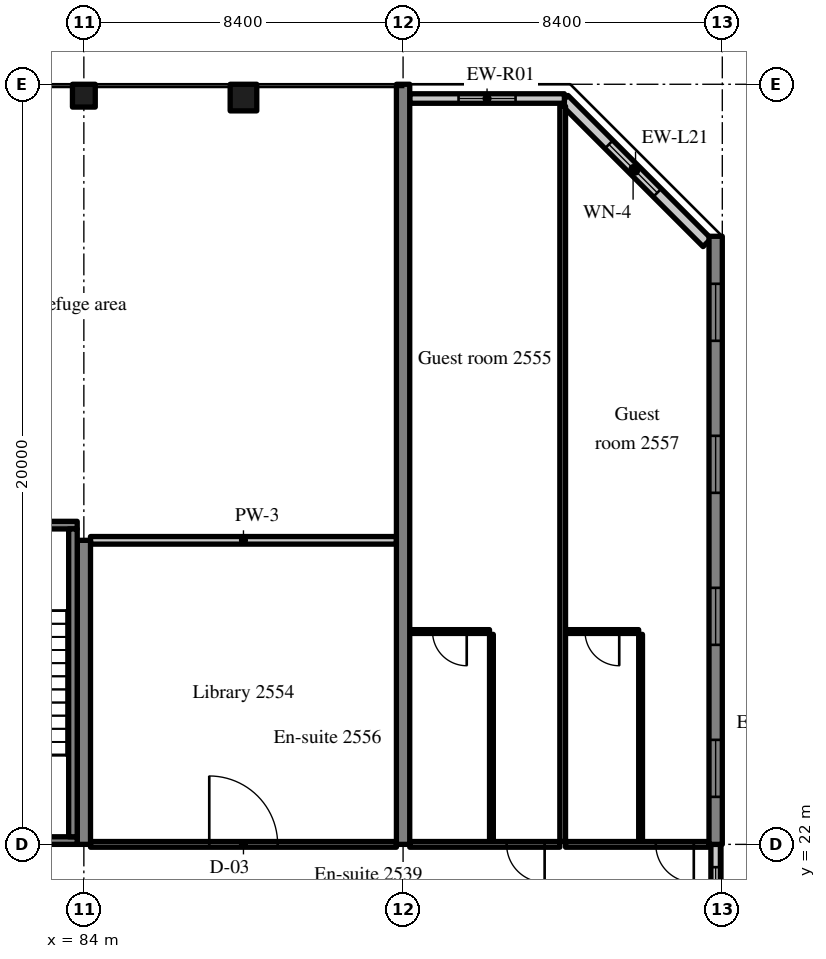
"""IFC4 building model, lengths in metres.
Left out: names, types, materials, properties, quantities, classifications, styles, units other than length and angle.
Written with IfcOpenShell. Run it as: python <this file> out.ifc"""

import sys

from ifc_helpers import new_model, si_unit, direction, frame, frame_2d, origin, origin_2d, place, context, subcontext, project, spatial, rectangle, extrude, source, transform, mapped, element, fill, save


model = new_model("IFC4")
c1 = context("Model", 3, precision=1e-05, world=origin(), true_north=direction((0.0, 1.0)))
c2 = subcontext(c1, "Body", "Model", "MODEL_VIEW")
j1 = project(units=[si_unit("LENGTHUNIT", "METRE"), si_unit("PLANEANGLEUNIT", "RADIAN")], contexts=[c1])
p1 = place(None, origin())
s1 = spatial("IfcSite", under=j1, at=p1, CompositionType="ELEMENT")
p2 = place(p1, origin())
s2 = spatial("IfcBuilding", under=s1, at=p2, CompositionType="ELEMENT")
p3 = place(p2, frame((0.0, 0.0, 106.6)))
s3 = spatial("IfcBuildingStorey", under=s2, at=p3, CompositionType="ELEMENT", Elevation=106.6)
m1 = source(origin(), c2, "Body", "SweptSolid", [
    extrude(rectangle(XDim=8.0, YDim=0.35, at=frame_2d((4.0, 0.0))), origin(), (0.0, 0.0, 1.0), 3.52),
])
p4 = place(p3, frame((84.0, 22.0, 0.0), z_axis=(0.0, 0.0, 1.0), x_axis=(0.0, 1.0, 0.0)))
e1 = element("IfcWall", 1, at=p4, inside=s3, PredefinedType="SHEAR", context=c2, shape_type="MappedRepresentation", body=[
    mapped(m1, transform((0.0, 0.0, 0.0), scale=1.0)),
])
m2 = source(origin(), c2, "Body", "SweptSolid", [
    extrude(rectangle(XDim=20.0, YDim=0.35, at=frame_2d((10.0, 0.0))), origin(), (0.0, 0.0, 1.0), 3.52),
])
p5 = place(p3, frame((92.4, 22.0, 0.0), z_axis=(0.0, 0.0, 1.0), x_axis=(0.0, 1.0, 0.0)))
e2 = element("IfcWall", 2, at=p5, inside=s3, PredefinedType="SHEAR", context=c2, shape_type="MappedRepresentation", body=[
    mapped(m2, transform((0.0, 0.0, 0.0), scale=1.0)),
])
m3 = source(origin(), c2, "Body", "SweptSolid", [
    extrude(rectangle(XDim=16.0, YDim=0.35, at=frame_2d((8.0, 0.0))), origin(), (0.0, 0.0, 1.0), 3.52),
])
p6 = place(p3, frame((100.625, 22.0, 0.0), z_axis=(0.0, 0.0, 1.0), x_axis=(0.0, 1.0, 0.0)))
e3 = element("IfcWall", 3, at=p6, inside=s3, PredefinedType="SHEAR", context=c2, shape_type="MappedRepresentation", body=[
    mapped(m3, transform((0.0, 0.0, 0.0), scale=1.0)),
])
m4 = source(origin(), c2, "Body", "SweptSolid", [
    extrude(rectangle(XDim=1.5, YDim=1.5, at=frame_2d((0.75, 0.75))), frame((0.0, 0.185, 0.0), z_axis=(0.0, -1.0, 0.0), x_axis=(1.0, 0.0, 0.0)), (0.0, 0.0, 1.0), 0.37),
])
p7 = place(p6, frame((1.25, 0.0, 0.9)))
e4 = element("IfcOpeningElement", 4, at=p7, cuts=e3, PredefinedType="OPENING", context=c2, shape_type="MappedRepresentation", body=[
    mapped(m4, transform((0.0, 0.0, 0.0), scale=1.0)),
])
p8 = place(p6, frame((5.25, 0.0, 0.9)))
e5 = element("IfcOpeningElement", 5, at=p8, cuts=e3, PredefinedType="OPENING", context=c2, shape_type="MappedRepresentation", body=[
    mapped(m4, transform((0.0, 0.0, 0.0), scale=1.0)),
])
p9 = place(p6, frame((9.25, 0.0, 0.9)))
e6 = element("IfcOpeningElement", 6, at=p9, cuts=e3, PredefinedType="OPENING", context=c2, shape_type="MappedRepresentation", body=[
    mapped(m4, transform((0.0, 0.0, 0.0), scale=1.0)),
])
p10 = place(p6, frame((13.25, 0.0, 0.9)))
e7 = element("IfcOpeningElement", 7, at=p10, cuts=e3, PredefinedType="OPENING", context=c2, shape_type="MappedRepresentation", body=[
    mapped(m4, transform((0.0, 0.0, 0.0), scale=1.0)),
])
m5 = source(origin(), c2, "Body", "SweptSolid", [
    extrude(rectangle(XDim=0.6, YDim=0.6, at=origin_2d()), origin(), (0.0, 0.0, 1.0), 3.52),
])
p11 = place(p3, frame((84.0, 41.7, 0.0), z_axis=(0.0, 0.0, 1.0), x_axis=(1.0, 0.0, 0.0)))
e8 = element("IfcColumn", 8, at=p11, inside=s3, PredefinedType="COLUMN", context=c2, shape_type="MappedRepresentation", body=[
    mapped(m5, transform((0.0, 0.0, 0.0), scale=1.0)),
])
m6 = source(origin(), c2, "Body", "SweptSolid", [
    extrude(rectangle(XDim=0.7, YDim=0.7, at=origin_2d()), origin(), (0.0, 0.0, 1.0), 3.52),
])
p12 = place(p3, frame((88.2, 41.65, 0.0), z_axis=(0.0, 0.0, 1.0), x_axis=(1.0, 0.0, 0.0)))
e9 = element("IfcColumn", 9, at=p12, inside=s3, PredefinedType="COLUMN", context=c2, shape_type="MappedRepresentation", body=[
    mapped(m6, transform((0.0, 0.0, 0.0), scale=1.0)),
])
m7 = source(origin(), c2, "Body", "SweptSolid", [
    extrude(rectangle(XDim=5.326, YDim=0.3, at=frame_2d((2.663, 0.0))), origin(), (0.0, 0.0, 1.0), 3.52),
])
p13 = place(p3, frame((100.4, 37.834, 0.0), z_axis=(0.0, 0.0, 1.0), x_axis=(-0.707083859269, 0.707129702361, 0.0)))
e10 = element("IfcWall", 10, at=p13, inside=s3, PredefinedType="SOLIDWALL", context=c2, shape_type="MappedRepresentation", body=[
    mapped(m7, transform((0.0, 0.0, 0.0), scale=1.0)),
])
m8 = source(origin(), c2, "Body", "SweptSolid", [
    extrude(rectangle(XDim=1.8, YDim=1.5, at=frame_2d((0.9, 0.75))), frame((0.0, 0.16, 0.0), z_axis=(0.0, -1.0, 0.0), x_axis=(1.0, 0.0, 0.0)), (0.0, 0.0, 1.0), 0.32),
])
p14 = place(p13, frame((1.854, 0.0, 0.9)))
e11 = element("IfcOpeningElement", 11, at=p14, cuts=e10, PredefinedType="OPENING", context=c2, shape_type="MappedRepresentation", body=[
    mapped(m8, transform((0.0, 0.0, 0.0), scale=1.0)),
])
m9 = source(origin(), c2, "Body", "SweptSolid", [
    extrude(rectangle(XDim=4.07, YDim=0.25, at=frame_2d((2.035, 0.0))), origin(), (0.0, 0.0, 1.0), 2.82),
])
p15 = place(p3, frame((96.645, 41.625, 0.0), z_axis=(0.0, 0.0, 1.0), x_axis=(-1.0, 0.0, 0.0)))
e12 = element("IfcWall", 12, at=p15, inside=s3, PredefinedType="SOLIDWALL", context=c2, shape_type="MappedRepresentation", body=[
    mapped(m9, transform((0.0, 0.0, 0.0), scale=1.0)),
])
m10 = source(origin(), c2, "Body", "SweptSolid", [
    extrude(rectangle(XDim=1.5, YDim=1.5, at=frame_2d((0.75, 0.75))), frame((0.0, 0.135, 0.0), z_axis=(0.0, -1.0, 0.0), x_axis=(1.0, 0.0, 0.0)), (0.0, 0.0, 1.0), 0.27),
])
p16 = place(p15, frame((1.285, 0.0, 0.9)))
e13 = element("IfcOpeningElement", 13, at=p16, cuts=e12, PredefinedType="OPENING", context=c2, shape_type="MappedRepresentation", body=[
    mapped(m10, transform((0.0, 0.0, 0.0), scale=1.0)),
])
m11 = source(origin(), c2, "Body", "SweptSolid", [
    extrude(rectangle(XDim=2.4, YDim=0.25, at=frame_2d((1.2, 0.0))), origin(), (0.0, 0.0, 1.0), 2.62),
])
p17 = place(p3, frame((100.625, 19.6, 0.0), z_axis=(0.0, 0.0, 1.0), x_axis=(0.0, 1.0, 0.0)))
e14 = element("IfcWall", 14, at=p17, inside=s3, PredefinedType="SOLIDWALL", context=c2, shape_type="MappedRepresentation", body=[
    mapped(m11, transform((0.0, 0.0, 0.0), scale=1.0)),
])
m12 = source(origin(), c2, "Body", "SweptSolid", [
    extrude(rectangle(XDim=1.2, YDim=1.5, at=frame_2d((0.6, 0.75))), frame((0.0, 0.135, 0.0), z_axis=(0.0, -1.0, 0.0), x_axis=(1.0, 0.0, 0.0)), (0.0, 0.0, 1.0), 0.27),
])
p18 = place(p17, frame((0.6, 0.0, 0.9)))
e15 = element("IfcOpeningElement", 15, at=p18, cuts=e14, PredefinedType="OPENING", context=c2, shape_type="MappedRepresentation", body=[
    mapped(m12, transform((0.0, 0.0, 0.0), scale=1.0)),
])
m13 = source(origin(), c2, "Body", "SweptSolid", [
    extrude(rectangle(XDim=8.225, YDim=0.2, at=frame_2d((4.112, 0.0))), origin(), (0.0, 0.0, 1.0), 3.52),
])
p19 = place(p3, frame((83.825, 22.1, 0.0), z_axis=(0.0, 0.0, 1.0), x_axis=(-1.0, 0.0, 0.0)))
e16 = element("IfcWall", 16, at=p19, inside=s3, PredefinedType="SOLIDWALL", context=c2, shape_type="MappedRepresentation", body=[
    mapped(m13, transform((0.0, 0.0, 0.0), scale=1.0)),
])
m14 = source(origin(), c2, "Body", "SweptSolid", [
    extrude(rectangle(XDim=1.2, YDim=2.1, at=frame_2d((0.6, 1.05))), frame((0.0, 0.11, 0.0), z_axis=(0.0, -1.0, 0.0), x_axis=(1.0, 0.0, 0.0)), (0.0, 0.0, 1.0), 0.22),
])
p20 = place(p19, frame((6.025, 0.0, 0.0)))
e17 = element("IfcOpeningElement", 17, at=p20, cuts=e16, PredefinedType="OPENING", context=c2, shape_type="MappedRepresentation", body=[
    mapped(m14, transform((0.0, 0.0, 0.0), scale=1.0)),
])
p21 = place(p3, frame((83.825, 30.4, 0.0), z_axis=(0.0, 0.0, 1.0), x_axis=(-1.0, 0.0, 0.0)))
e18 = element("IfcWall", 18, at=p21, inside=s3, PredefinedType="SOLIDWALL", context=c2, shape_type="MappedRepresentation", body=[
    mapped(m13, transform((0.0, 0.0, 0.0), scale=1.0)),
])
m15 = source(origin(), c2, "Body", "SweptSolid", [
    extrude(rectangle(XDim=1.0, YDim=2.1, at=frame_2d((0.5, 1.05))), frame((0.0, 0.11, 0.0), z_axis=(0.0, -1.0, 0.0), x_axis=(1.0, 0.0, 0.0)), (0.0, 0.0, 1.0), 0.22),
])
p22 = place(p21, frame((6.125, 0.0, 0.0)))
e19 = element("IfcOpeningElement", 19, at=p22, cuts=e18, PredefinedType="OPENING", context=c2, shape_type="MappedRepresentation", body=[
    mapped(m15, transform((0.0, 0.0, 0.0), scale=1.0)),
])
m16 = source(origin(), c2, "Body", "SweptSolid", [
    extrude(rectangle(XDim=8.1, YDim=0.225, at=frame_2d((4.05, 0.0))), origin(), (0.0, 0.0, 1.0), 3.52),
])
p23 = place(p3, frame((83.713, 22.2, 0.0), z_axis=(0.0, 0.0, 1.0), x_axis=(0.0, 1.0, 0.0)))
e20 = element("IfcWall", 20, at=p23, inside=s3, PredefinedType="SOLIDWALL", context=c2, shape_type="MappedRepresentation", body=[
    mapped(m16, transform((0.0, 0.0, 0.0), scale=1.0)),
])
m17 = source(origin(), c2, "Body", "SweptSolid", [
    extrude(rectangle(XDim=8.05, YDim=0.15, at=frame_2d((4.025, 0.0))), origin(), (0.0, 0.0, 1.0), 2.82),
])
p24 = place(p3, frame((84.175, 22.0, 0.0), z_axis=(0.0, 0.0, 1.0), x_axis=(1.0, 0.0, 0.0)))
e21 = element("IfcWall", 21, at=p24, inside=s3, PredefinedType="PARTITIONING", context=c2, shape_type="MappedRepresentation", body=[
    mapped(m17, transform((0.0, 0.0, 0.0), scale=1.0)),
])
m18 = source(origin(), c2, "Body", "SweptSolid", [
    extrude(rectangle(XDim=1.8, YDim=2.1, at=frame_2d((0.9, 1.05))), frame((0.0, 0.085, 0.0), z_axis=(0.0, -1.0, 0.0), x_axis=(1.0, 0.0, 0.0)), (0.0, 0.0, 1.0), 0.17),
])
p25 = place(p24, frame((3.125, 0.0, 0.0)))
e22 = element("IfcOpeningElement", 22, at=p25, cuts=e21, PredefinedType="OPENING", context=c2, shape_type="MappedRepresentation", body=[
    mapped(m18, transform((0.0, 0.0, 0.0), scale=1.0)),
])
m19 = source(origin(), c2, "Body", "SweptSolid", [
    extrude(rectangle(XDim=8.05, YDim=0.2, at=frame_2d((4.025, 0.0))), origin(), (0.0, 0.0, 1.0), 3.52),
])
p26 = place(p3, frame((84.175, 30.0, 0.0), z_axis=(0.0, 0.0, 1.0), x_axis=(1.0, 0.0, 0.0)))
e23 = element("IfcWall", 23, at=p26, inside=s3, PredefinedType="PARTITIONING", context=c2, shape_type="MappedRepresentation", body=[
    mapped(m19, transform((0.0, 0.0, 0.0), scale=1.0)),
])
m20 = source(origin(), c2, "Body", "SweptSolid", [
    extrude(rectangle(XDim=5.45, YDim=0.1, at=frame_2d((2.725, 0.0))), origin(), (0.0, 0.0, 1.0), 3.52),
])
p27 = place(p3, frame((94.725, 22.075, 0.0), z_axis=(0.0, 0.0, 1.0), x_axis=(0.0, 1.0, 0.0)))
e24 = element("IfcWall", 24, at=p27, inside=s3, PredefinedType="PARTITIONING", context=c2, shape_type="MappedRepresentation", body=[
    mapped(m20, transform((0.0, 0.0, 0.0), scale=1.0)),
])
m21 = source(origin(), c2, "Body", "SweptSolid", [
    extrude(rectangle(XDim=2.1, YDim=0.1, at=frame_2d((1.05, 0.0))), origin(), (0.0, 0.0, 1.0), 3.52),
])
p28 = place(p3, frame((92.575, 27.6, 0.0), z_axis=(0.0, 0.0, 1.0), x_axis=(1.0, 0.0, 0.0)))
e25 = element("IfcWall", 25, at=p28, inside=s3, PredefinedType="PARTITIONING", context=c2, shape_type="MappedRepresentation", body=[
    mapped(m21, transform((0.0, 0.0, 0.0), scale=1.0)),
])
m22 = source(origin(), c2, "Body", "SweptSolid", [
    extrude(rectangle(XDim=0.9, YDim=2.1, at=frame_2d((0.45, 1.05))), frame((0.0, 0.06, 0.0), z_axis=(0.0, -1.0, 0.0), x_axis=(1.0, 0.0, 0.0)), (0.0, 0.0, 1.0), 0.12),
])
p29 = place(p28, frame((0.6, 0.0, 0.0)))
e26 = element("IfcOpeningElement", 26, at=p29, cuts=e25, PredefinedType="OPENING", context=c2, shape_type="MappedRepresentation", body=[
    mapped(m22, transform((0.0, 0.0, 0.0), scale=1.0)),
])
m23 = source(origin(), c2, "Body", "SweptSolid", [
    extrude(rectangle(XDim=3.95, YDim=0.15, at=frame_2d((1.975, 0.0))), origin(), (0.0, 0.0, 1.0), 2.82),
])
p30 = place(p3, frame((92.575, 22.0, 0.0), z_axis=(0.0, 0.0, 1.0), x_axis=(1.0, 0.0, 0.0)))
e27 = element("IfcWall", 27, at=p30, inside=s3, PredefinedType="PARTITIONING", context=c2, shape_type="MappedRepresentation", body=[
    mapped(m23, transform((0.0, 0.0, 0.0), scale=1.0)),
])
m24 = source(origin(), c2, "Body", "SweptSolid", [
    extrude(rectangle(XDim=1.0, YDim=2.1, at=frame_2d((0.5, 1.05))), frame((0.0, 0.085, 0.0), z_axis=(0.0, -1.0, 0.0), x_axis=(1.0, 0.0, 0.0)), (0.0, 0.0, 1.0), 0.17),
])
p31 = place(p30, frame((2.55, 0.0, 0.0)))
e28 = element("IfcOpeningElement", 28, at=p31, cuts=e27, PredefinedType="OPENING", context=c2, shape_type="MappedRepresentation", body=[
    mapped(m24, transform((0.0, 0.0, 0.0), scale=1.0)),
])
p32 = place(p3, frame((98.65, 22.075, 0.0), z_axis=(0.0, 0.0, 1.0), x_axis=(0.0, 1.0, 0.0)))
e29 = element("IfcWall", 29, at=p32, inside=s3, PredefinedType="PARTITIONING", context=c2, shape_type="MappedRepresentation", body=[
    mapped(m20, transform((0.0, 0.0, 0.0), scale=1.0)),
])
m25 = source(origin(), c2, "Body", "SweptSolid", [
    extrude(rectangle(XDim=1.925, YDim=0.1, at=frame_2d((0.962, 0.0))), origin(), (0.0, 0.0, 1.0), 3.52),
])
p33 = place(p3, frame((96.675, 27.6, 0.0), z_axis=(0.0, 0.0, 1.0), x_axis=(1.0, 0.0, 0.0)))
e30 = element("IfcWall", 30, at=p33, inside=s3, PredefinedType="PARTITIONING", context=c2, shape_type="MappedRepresentation", body=[
    mapped(m25, transform((0.0, 0.0, 0.0), scale=1.0)),
])
p34 = place(p33, frame((0.513, 0.0, 0.0)))
e31 = element("IfcOpeningElement", 31, at=p34, cuts=e30, PredefinedType="OPENING", context=c2, shape_type="MappedRepresentation", body=[
    mapped(m22, transform((0.0, 0.0, 0.0), scale=1.0)),
])
m26 = source(origin(), c2, "Body", "SweptSolid", [
    extrude(rectangle(XDim=3.775, YDim=0.15, at=frame_2d((1.887, 0.0))), origin(), (0.0, 0.0, 1.0), 2.82),
])
p35 = place(p3, frame((96.675, 22.0, 0.0), z_axis=(0.0, 0.0, 1.0), x_axis=(1.0, 0.0, 0.0)))
e32 = element("IfcWall", 32, at=p35, inside=s3, PredefinedType="PARTITIONING", context=c2, shape_type="MappedRepresentation", body=[
    mapped(m26, transform((0.0, 0.0, 0.0), scale=1.0)),
])
p36 = place(p35, frame((2.375, 0.0, 0.0)))
e33 = element("IfcOpeningElement", 33, at=p36, cuts=e32, PredefinedType="OPENING", context=c2, shape_type="MappedRepresentation", body=[
    mapped(m24, transform((0.0, 0.0, 0.0), scale=1.0)),
])
m27 = source(origin(), c2, "Body", "SweptSolid", [
    extrude(rectangle(XDim=19.347, YDim=0.15, at=frame_2d((9.674, 0.0))), origin(), (0.0, 0.0, 1.0), 3.52),
])
p37 = place(p3, frame((96.6, 22.075, 0.0), z_axis=(0.0, 0.0, 1.0), x_axis=(0.0, 1.0, 0.0)))
e34 = element("IfcWall", 34, at=p37, inside=s3, PredefinedType="PARTITIONING", context=c2, shape_type="MappedRepresentation", body=[
    mapped(m27, transform((0.0, 0.0, 0.0), scale=1.0)),
])
m28 = source(origin(), c2, "Body", "SweptSolid", [
    extrude(rectangle(XDim=1.8, YDim=1.5, at=frame_2d((0.9, 0.75))), frame((0.0, 0.03, 0.0), z_axis=(0.0, -1.0, 0.0), x_axis=(1.0, 0.0, 0.0)), (0.0, 0.0, 1.0), 0.06),
])
p38 = place(p14, origin())
e35 = element("IfcWindow", 35, at=p38, inside=s3, PartitioningType="SINGLE_PANEL", PredefinedType="WINDOW", context=c2, shape_type="MappedRepresentation", body=[
    mapped(m28, transform((0.0, 0.0, 0.0), scale=1.0)),
])
fill(e11, e35)
m29 = source(origin(), c2, "Body", "SweptSolid", [
    extrude(rectangle(XDim=1.5, YDim=1.5, at=frame_2d((0.75, 0.75))), frame((0.0, 0.03, 0.0), z_axis=(0.0, -1.0, 0.0), x_axis=(1.0, 0.0, 0.0)), (0.0, 0.0, 1.0), 0.06),
])
p39 = place(p16, origin())
e36 = element("IfcWindow", 36, at=p39, inside=s3, PartitioningType="SINGLE_PANEL", PredefinedType="WINDOW", context=c2, shape_type="MappedRepresentation", body=[
    mapped(m29, transform((0.0, 0.0, 0.0), scale=1.0)),
])
fill(e13, e36)
p40 = place(p7, origin())
e37 = element("IfcWindow", 37, at=p40, inside=s3, PartitioningType="SINGLE_PANEL", PredefinedType="WINDOW", context=c2, shape_type="MappedRepresentation", body=[
    mapped(m29, transform((0.0, 0.0, 0.0), scale=1.0)),
])
fill(e4, e37)
p41 = place(p8, origin())
e38 = element("IfcWindow", 38, at=p41, inside=s3, PartitioningType="SINGLE_PANEL", PredefinedType="WINDOW", context=c2, shape_type="MappedRepresentation", body=[
    mapped(m29, transform((0.0, 0.0, 0.0), scale=1.0)),
])
fill(e5, e38)
p42 = place(p9, origin())
e39 = element("IfcWindow", 39, at=p42, inside=s3, PartitioningType="SINGLE_PANEL", PredefinedType="WINDOW", context=c2, shape_type="MappedRepresentation", body=[
    mapped(m29, transform((0.0, 0.0, 0.0), scale=1.0)),
])
fill(e6, e39)
p43 = place(p10, origin())
e40 = element("IfcWindow", 40, at=p43, inside=s3, PartitioningType="SINGLE_PANEL", PredefinedType="WINDOW", context=c2, shape_type="MappedRepresentation", body=[
    mapped(m29, transform((0.0, 0.0, 0.0), scale=1.0)),
])
fill(e7, e40)
m30 = source(origin(), c2, "Body", "SweptSolid", [
    extrude(rectangle(XDim=1.2, YDim=1.5, at=frame_2d((0.6, 0.75))), frame((0.0, 0.03, 0.0), z_axis=(0.0, -1.0, 0.0), x_axis=(1.0, 0.0, 0.0)), (0.0, 0.0, 1.0), 0.06),
])
p44 = place(p18, origin())
e41 = element("IfcWindow", 41, at=p44, inside=s3, PartitioningType="SINGLE_PANEL", PredefinedType="WINDOW", context=c2, shape_type="MappedRepresentation", body=[
    mapped(m30, transform((0.0, 0.0, 0.0), scale=1.0)),
])
fill(e15, e41)
m31 = source(origin(), c2, "Body", "SweptSolid", [
    extrude(rectangle(XDim=1.8, YDim=2.1, at=frame_2d((0.9, 1.05))), frame((0.0, 0.025, 0.0), z_axis=(0.0, -1.0, 0.0), x_axis=(1.0, 0.0, 0.0)), (0.0, 0.0, 1.0), 0.05),
])
p45 = place(p25, origin())
e42 = element("IfcDoor", 42, at=p45, inside=s3, OperationType="DOUBLE_DOOR_SINGLE_SWING", PredefinedType="DOOR", context=c2, shape_type="MappedRepresentation", body=[
    mapped(m31, transform((0.0, 0.0, 0.0), scale=1.0)),
])
fill(e22, e42)
m32 = source(origin(), c2, "Body", "SweptSolid", [
    extrude(rectangle(XDim=0.9, YDim=2.1, at=frame_2d((0.45, 1.05))), frame((0.0, 0.025, 0.0), z_axis=(0.0, -1.0, 0.0), x_axis=(1.0, 0.0, 0.0)), (0.0, 0.0, 1.0), 0.05),
])
p46 = place(p29, origin())
e43 = element("IfcDoor", 43, at=p46, inside=s3, OperationType="SINGLE_SWING_RIGHT", PredefinedType="DOOR", context=c2, shape_type="MappedRepresentation", body=[
    mapped(m32, transform((0.0, 0.0, 0.0), scale=1.0)),
])
fill(e26, e43)
m33 = source(origin(), c2, "Body", "SweptSolid", [
    extrude(rectangle(XDim=1.0, YDim=2.1, at=frame_2d((0.5, 1.05))), frame((0.0, 0.025, 0.0), z_axis=(0.0, -1.0, 0.0), x_axis=(1.0, 0.0, 0.0)), (0.0, 0.0, 1.0), 0.05),
])
p47 = place(p31, origin())
e44 = element("IfcDoor", 44, at=p47, inside=s3, OperationType="SINGLE_SWING_RIGHT", PredefinedType="DOOR", context=c2, shape_type="MappedRepresentation", body=[
    mapped(m33, transform((0.0, 0.0, 0.0), scale=1.0)),
])
fill(e28, e44)
p48 = place(p34, origin())
e45 = element("IfcDoor", 45, at=p48, inside=s3, OperationType="SINGLE_SWING_RIGHT", PredefinedType="DOOR", context=c2, shape_type="MappedRepresentation", body=[
    mapped(m32, transform((0.0, 0.0, 0.0), scale=1.0)),
])
fill(e31, e45)
p49 = place(p36, origin())
e46 = element("IfcDoor", 46, at=p49, inside=s3, OperationType="SINGLE_SWING_RIGHT", PredefinedType="DOOR", context=c2, shape_type="MappedRepresentation", body=[
    mapped(m33, transform((0.0, 0.0, 0.0), scale=1.0)),
])
fill(e33, e46)
save(model, sys.argv[1])
